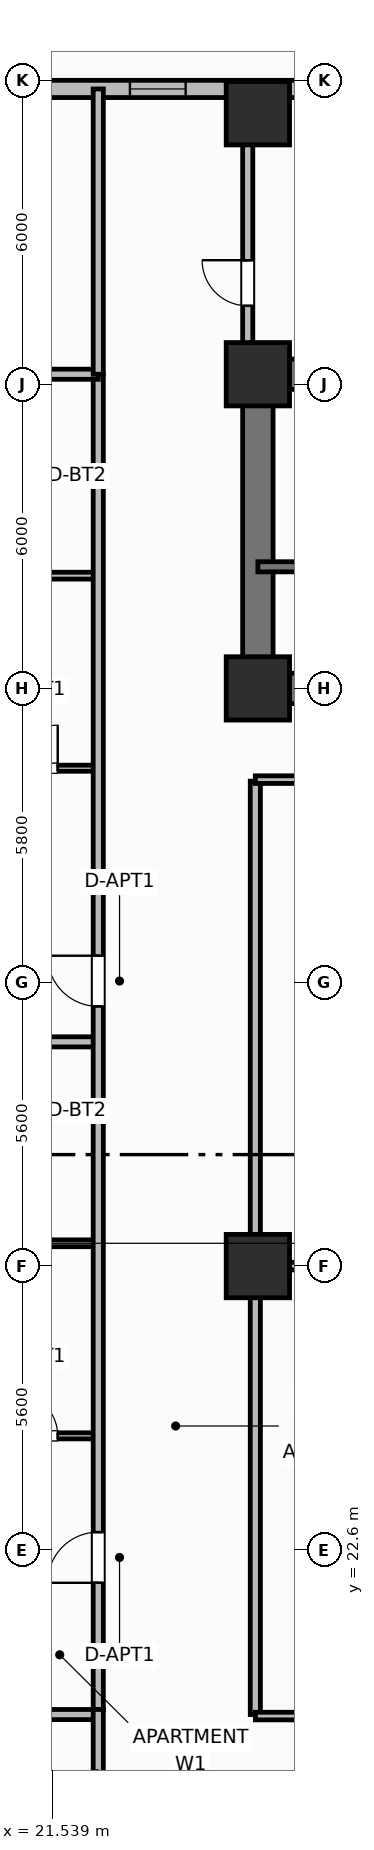
"""IFC4 building model, lengths in metres.
Left out: names, types, materials, properties, quantities, classifications, styles, units other than length and angle.
Written with IfcOpenShell. Run it as: python <this file> out.ifc"""

import sys

from ifc_helpers import new_model, si_unit, direction, frame, frame_2d, origin, origin_2d, place, context, subcontext, project, spatial, rectangle, extrude, element, fill, save


model = new_model("IFC4")
c1 = context("Model", 3, precision=1e-05, world=origin(), true_north=direction((0.0, 1.0)))
c2 = subcontext(c1, "Body", "Model", "MODEL_VIEW")
j1 = project(units=[si_unit("LENGTHUNIT", "METRE"), si_unit("PLANEANGLEUNIT", "RADIAN")], contexts=[c1])
p1 = place(None, origin())
s1 = spatial("IfcSite", under=j1, at=p1, CompositionType="ELEMENT")
p2 = place(p1, origin())
s2 = spatial("IfcBuilding", under=s1, at=p2, CompositionType="ELEMENT")
p3 = place(p2, frame((0.0, 0.0, 24.6)))
s3 = spatial("IfcBuildingStorey", under=s2, at=p3, CompositionType="ELEMENT", Elevation=24.6)
p4 = place(p3, frame((25.6, 45.8, 0.0), z_axis=(0.0, 0.0, 1.0), x_axis=(1.0, 0.0, 0.0)))
e1 = element("IfcWall", 1, at=p4, inside=s3, PredefinedType="SHEAR", context=c2, shape_type="SweptSolid", body=[
    extrude(rectangle(XDim=27.2, YDim=0.6, at=frame_2d((13.6, 0.0))), origin(), (0.0, 0.0, 1.0), 4.2),
])
p5 = place(p3, frame((25.6, 39.9, 0.0), z_axis=(0.0, 0.0, 1.0), x_axis=(0.0, 1.0, 0.0)))
e2 = element("IfcWall", 2, at=p5, inside=s3, PredefinedType="SHEAR", context=c2, shape_type="SweptSolid", body=[
    extrude(rectangle(XDim=5.6, YDim=0.6, at=frame_2d((2.8, 0.0))), origin(), (0.0, 0.0, 1.0), 4.2),
])
p6 = place(p3, frame((52.8, 39.6, 0.0), z_axis=(0.0, 0.0, 1.0), x_axis=(-1.0, 0.0, 0.0)))
e3 = element("IfcWall", 3, at=p6, inside=s3, PredefinedType="SHEAR", context=c2, shape_type="SweptSolid", body=[
    extrude(rectangle(XDim=27.2, YDim=0.6, at=frame_2d((13.6, 0.0))), origin(), (0.0, 0.0, 1.0), 4.2),
])
p7 = place(p6, frame((24.2, 0.0, 0.0)))
e4 = element("IfcOpeningElement", 4, at=p7, cuts=e3, PredefinedType="OPENING", context=c2, shape_type="SweptSolid", body=[
    extrude(rectangle(XDim=1.1, YDim=2.15, at=frame_2d((0.55, 1.075))), frame((0.0, 0.31, 0.0), z_axis=(0.0, -1.0, 0.0), x_axis=(1.0, 0.0, 0.0)), (0.0, 0.0, 1.0), 0.62),
])
p8 = place(p6, frame((20.55, 0.0, 0.0)))
e5 = element("IfcOpeningElement", 5, at=p8, cuts=e3, PredefinedType="OPENING", context=c2, shape_type="SweptSolid", body=[
    extrude(rectangle(XDim=0.95, YDim=2.1, at=frame_2d((0.475, 1.05))), frame((0.0, 0.31, 0.0), z_axis=(0.0, -1.0, 0.0), x_axis=(1.0, 0.0, 0.0)), (0.0, 0.0, 1.0), 0.62),
])
p9 = place(p6, frame((15.1, 0.0, 0.0)))
e6 = element("IfcOpeningElement", 6, at=p9, cuts=e3, PredefinedType="OPENING", context=c2, shape_type="SweptSolid", body=[
    extrude(rectangle(XDim=1.2, YDim=2.15, at=frame_2d((0.6, 1.075))), frame((0.0, 0.31, 0.0), z_axis=(0.0, -1.0, 0.0), x_axis=(1.0, 0.0, 0.0)), (0.0, 0.0, 1.0), 0.62),
])
p10 = place(p6, frame((11.6, 0.0, 0.0)))
e7 = element("IfcOpeningElement", 7, at=p10, cuts=e3, PredefinedType="OPENING", context=c2, shape_type="SweptSolid", body=[
    extrude(rectangle(XDim=0.9, YDim=2.1, at=frame_2d((0.45, 1.05))), frame((0.0, 0.31, 0.0), z_axis=(0.0, -1.0, 0.0), x_axis=(1.0, 0.0, 0.0)), (0.0, 0.0, 1.0), 0.62),
])
p11 = place(p6, frame((4.8, 0.0, 0.0)))
e8 = element("IfcOpeningElement", 8, at=p11, cuts=e3, PredefinedType="OPENING", context=c2, shape_type="SweptSolid", body=[
    extrude(rectangle(XDim=0.85, YDim=2.1, at=frame_2d((0.425, 1.05))), frame((0.0, 0.31, 0.0), z_axis=(0.0, -1.0, 0.0), x_axis=(1.0, 0.0, 0.0)), (0.0, 0.0, 1.0), 0.62),
])
p12 = place(p6, frame((1.9, 0.0, 0.0)))
e9 = element("IfcOpeningElement", 9, at=p12, cuts=e3, PredefinedType="OPENING", context=c2, shape_type="SweptSolid", body=[
    extrude(rectangle(XDim=0.85, YDim=2.1, at=frame_2d((0.425, 1.05))), frame((0.0, 0.31, 0.0), z_axis=(0.0, -1.0, 0.0), x_axis=(1.0, 0.0, 0.0)), (0.0, 0.0, 1.0), 0.62),
])
for number, where, z_axis, x_axis in (
    (10, (25.6, 39.6, 0.0), (0.0, 0.0, 1.0), (1.0, 0.0, 0.0)),
    (11, (25.6, 45.8, 0.0), (0.0, 0.0, 1.0), (1.0, 0.0, 0.0)),
    (12, (25.6, 28.2, 0.0), (0.0, 0.0, 1.0), (1.0, 0.0, 0.0)),
    (13, (25.6, 50.95, 0.0), (0.0, 0.0, 1.0), (1.0, 0.0, 0.0)),
):
    element("IfcColumn", number, at=place(p3, frame(where, z_axis=z_axis, x_axis=x_axis)), inside=s3, PredefinedType="COLUMN", context=c2, shape_type="SweptSolid", body=[
        extrude(rectangle(XDim=1.25, YDim=1.25, at=origin_2d()), origin(), (0.0, 0.0, 1.0), 4.2),
    ])
p13 = place(p3, frame((36.0, 51.43, 0.0), z_axis=(0.0, 0.0, 1.0), x_axis=(-1.0, 0.0, 0.0)))
e14 = element("IfcWall", 14, at=p13, inside=s3, PredefinedType="SOLIDWALL", context=c2, shape_type="SweptSolid", body=[
    extrude(rectangle(XDim=17.4, YDim=0.34, at=frame_2d((8.7, 0.0))), origin(), (0.0, 0.0, 1.0), 3.2),
])
p14 = place(p13, frame((4.125, 0.0, 0.95)))
e15 = element("IfcOpeningElement", 15, at=p14, cuts=e14, PredefinedType="OPENING", context=c2, shape_type="SweptSolid", body=[
    extrude(rectangle(XDim=1.1, YDim=1.65, at=frame_2d((0.55, 0.825))), frame((0.0, 0.18, 0.0), z_axis=(0.0, -1.0, 0.0), x_axis=(1.0, 0.0, 0.0)), (0.0, 0.0, 1.0), 0.36),
])
p15 = place(p13, frame((6.808, 0.0, 0.95)))
e16 = element("IfcOpeningElement", 16, at=p15, cuts=e14, PredefinedType="OPENING", context=c2, shape_type="SweptSolid", body=[
    extrude(rectangle(XDim=1.1, YDim=1.65, at=frame_2d((0.55, 0.825))), frame((0.0, 0.18, 0.0), z_axis=(0.0, -1.0, 0.0), x_axis=(1.0, 0.0, 0.0)), (0.0, 0.0, 1.0), 0.36),
])
p16 = place(p13, frame((11.825, 0.0, 0.95)))
e17 = element("IfcOpeningElement", 17, at=p16, cuts=e14, PredefinedType="OPENING", context=c2, shape_type="SweptSolid", body=[
    extrude(rectangle(XDim=1.1, YDim=1.65, at=frame_2d((0.55, 0.825))), frame((0.0, 0.18, 0.0), z_axis=(0.0, -1.0, 0.0), x_axis=(1.0, 0.0, 0.0)), (0.0, 0.0, 1.0), 0.36),
])
p17 = place(p13, frame((14.858, 0.0, 0.95)))
e18 = element("IfcOpeningElement", 18, at=p17, cuts=e14, PredefinedType="OPENING", context=c2, shape_type="SweptSolid", body=[
    extrude(rectangle(XDim=1.1, YDim=1.65, at=frame_2d((0.55, 0.825))), frame((0.0, 0.18, 0.0), z_axis=(0.0, -1.0, 0.0), x_axis=(1.0, 0.0, 0.0)), (0.0, 0.0, 1.0), 0.36),
])
p18 = place(p3, frame((35.15, 42.0, 0.0), z_axis=(0.0, 0.0, 1.0), x_axis=(-1.0, 0.0, 0.0)))
e19 = element("IfcWall", 19, at=p18, inside=s3, PredefinedType="SHEAR", context=c2, shape_type="SweptSolid", body=[
    extrude(rectangle(XDim=9.55, YDim=0.2, at=frame_2d((4.775, 0.0))), origin(), (0.0, 0.0, 1.0), 4.2),
])
p19 = place(p18, frame((7.25, 0.0, 0.0)))
e20 = element("IfcOpeningElement", 20, at=p19, cuts=e19, PredefinedType="OPENING", context=c2, shape_type="SweptSolid", body=[
    extrude(rectangle(XDim=1.1, YDim=2.15, at=frame_2d((0.55, 1.075))), frame((0.0, 0.11, 0.0), z_axis=(0.0, -1.0, 0.0), x_axis=(1.0, 0.0, 0.0)), (0.0, 0.0, 1.0), 0.22),
])
p20 = place(p3, frame((25.55, 19.35, 0.0), z_axis=(0.0, 0.0, 1.0), x_axis=(0.0, 1.0, 0.0)))
e21 = element("IfcWall", 21, at=p20, inside=s3, PredefinedType="PARTITIONING", context=c2, shape_type="SweptSolid", body=[
    extrude(rectangle(XDim=18.42, YDim=0.2, at=frame_2d((9.21, 0.0))), origin(), (0.0, 0.0, 1.0), 3.03),
])
p21 = place(p3, frame((14.57, 19.35, 0.0), z_axis=(0.0, 0.0, 1.0), x_axis=(1.0, 0.0, 0.0)))
e22 = element("IfcWall", 22, at=p21, inside=s3, PredefinedType="PARTITIONING", context=c2, shape_type="SweptSolid", body=[
    extrude(rectangle(XDim=7.88, YDim=0.2, at=frame_2d((3.94, 0.0))), origin(), (0.0, 0.0, 1.0), 3.03),
])
for number, where, z_axis, x_axis in (
    (23, (25.55, 19.32, 0.0), (0.0, 0.0, 1.0), (1.0, 0.0, 0.0)),
    (24, (25.55, 37.8, 0.0), (0.0, 0.0, 1.0), (1.0, 0.0, 0.0)),
):
    element("IfcWall", number, at=place(p3, frame(where, z_axis=z_axis, x_axis=x_axis)), inside=s3, PredefinedType="PARTITIONING", context=c2, shape_type="SweptSolid", body=[
        extrude(rectangle(XDim=14.9, YDim=0.15, at=frame_2d((7.45, 0.0))), origin(), (0.0, 0.0, 1.0), 3.03),
    ])
p22 = place(p3, frame((25.6, 28.2, 0.0), z_axis=(0.0, 0.0, 1.0), x_axis=(1.0, 0.0, 0.0)))
e25 = element("IfcWall", 25, at=p22, inside=s3, PredefinedType="PARTITIONING", context=c2, shape_type="SweptSolid", body=[
    extrude(rectangle(XDim=14.87, YDim=0.15, at=frame_2d((7.435, 0.0))), origin(), (0.0, 0.0, 1.0), 3.03),
])
p23 = place(p3, frame((20.2, 24.85, 0.0), z_axis=(0.0, 0.0, 1.0), x_axis=(1.0, 0.0, 0.0)))
e26 = element("IfcWall", 26, at=p23, inside=s3, PredefinedType="PARTITIONING", context=c2, shape_type="SweptSolid", body=[
    extrude(rectangle(XDim=2.25, YDim=0.12, at=frame_2d((1.125, 0.0))), origin(), (0.0, 0.0, 1.0), 3.03),
])
p24 = place(p23, frame((0.6, 0.0, 0.0)))
e27 = element("IfcOpeningElement", 27, at=p24, cuts=e26, PredefinedType="OPENING", context=c2, shape_type="SweptSolid", body=[
    extrude(rectangle(XDim=0.85, YDim=2.1, at=frame_2d((0.425, 1.05))), frame((0.0, 0.07, 0.0), z_axis=(0.0, -1.0, 0.0), x_axis=(1.0, 0.0, 0.0)), (0.0, 0.0, 1.0), 0.14),
])
p25 = place(p3, frame((20.2, 28.65, 0.0), z_axis=(0.0, 0.0, 1.0), x_axis=(1.0, 0.0, 0.0)))
e28 = element("IfcWall", 28, at=p25, inside=s3, PredefinedType="PARTITIONING", context=c2, shape_type="SweptSolid", body=[
    extrude(rectangle(XDim=2.25, YDim=0.135, at=frame_2d((1.125, 0.0))), origin(), (0.0, 0.0, 1.0), 3.03),
])
p26 = place(p3, frame((14.57, 32.625, 0.0), z_axis=(0.0, 0.0, 1.0), x_axis=(1.0, 0.0, 0.0)))
e29 = element("IfcWall", 29, at=p26, inside=s3, PredefinedType="PARTITIONING", context=c2, shape_type="SweptSolid", body=[
    extrude(rectangle(XDim=7.88, YDim=0.2, at=frame_2d((3.94, 0.0))), origin(), (0.0, 0.0, 1.0), 3.03),
])
p27 = place(p3, frame((20.2, 38.025, 0.0), z_axis=(0.0, 0.0, 1.0), x_axis=(1.0, 0.0, 0.0)))
e30 = element("IfcWall", 30, at=p27, inside=s3, PredefinedType="PARTITIONING", context=c2, shape_type="SweptSolid", body=[
    extrude(rectangle(XDim=2.25, YDim=0.12, at=frame_2d((1.125, 0.0))), origin(), (0.0, 0.0, 1.0), 3.03),
])
p28 = place(p27, frame((0.6, 0.0, 0.0)))
e31 = element("IfcOpeningElement", 31, at=p28, cuts=e30, PredefinedType="OPENING", context=c2, shape_type="SweptSolid", body=[
    extrude(rectangle(XDim=0.85, YDim=2.1, at=frame_2d((0.425, 1.05))), frame((0.0, 0.07, 0.0), z_axis=(0.0, -1.0, 0.0), x_axis=(1.0, 0.0, 0.0)), (0.0, 0.0, 1.0), 0.14),
])
p29 = place(p3, frame((20.2, 41.825, 0.0), z_axis=(0.0, 0.0, 1.0), x_axis=(1.0, 0.0, 0.0)))
e32 = element("IfcWall", 32, at=p29, inside=s3, PredefinedType="PARTITIONING", context=c2, shape_type="SweptSolid", body=[
    extrude(rectangle(XDim=2.25, YDim=0.135, at=frame_2d((1.125, 0.0))), origin(), (0.0, 0.0, 1.0), 3.03),
])
p30 = place(p3, frame((22.45, 19.45, 0.0), z_axis=(0.0, 0.0, 1.0), x_axis=(0.0, 1.0, 0.0)))
e33 = element("IfcWall", 33, at=p30, inside=s3, PredefinedType="PARTITIONING", context=c2, shape_type="SweptSolid", body=[
    extrude(rectangle(XDim=26.35, YDim=0.2, at=frame_2d((13.175, 0.0))), origin(), (0.0, 0.0, 1.0), 3.03),
])
p31 = place(p30, frame((2.5, 0.0, 0.0)))
e34 = element("IfcOpeningElement", 34, at=p31, cuts=e33, PredefinedType="OPENING", context=c2, shape_type="SweptSolid", body=[
    extrude(rectangle(XDim=1.0, YDim=2.15, at=frame_2d((0.5, 1.075))), frame((0.0, 0.11, 0.0), z_axis=(0.0, -1.0, 0.0), x_axis=(1.0, 0.0, 0.0)), (0.0, 0.0, 1.0), 0.22),
])
p32 = place(p30, frame((13.875, 0.0, 0.0)))
e35 = element("IfcOpeningElement", 35, at=p32, cuts=e33, PredefinedType="OPENING", context=c2, shape_type="SweptSolid", body=[
    extrude(rectangle(XDim=1.0, YDim=2.15, at=frame_2d((0.5, 1.075))), frame((0.0, 0.11, 0.0), z_axis=(0.0, -1.0, 0.0), x_axis=(1.0, 0.0, 0.0)), (0.0, 0.0, 1.0), 0.22),
])
p33 = place(p3, frame((14.99, 45.8, 0.0), z_axis=(0.0, 0.0, 1.0), x_axis=(1.0, 0.0, 0.0)))
e36 = element("IfcWall", 36, at=p33, inside=s3, PredefinedType="PARTITIONING", context=c2, shape_type="SweptSolid", body=[
    extrude(rectangle(XDim=7.46, YDim=0.2, at=frame_2d((3.73, 0.0))), origin(), (0.0, 0.0, 1.0), 3.03),
])
p34 = place(p3, frame((22.45, 4.97, 0.0), z_axis=(0.0, 0.0, 1.0), x_axis=(0.0, 1.0, 0.0)))
e37 = element("IfcWall", 37, at=p34, inside=s3, PredefinedType="PARTITIONING", context=c2, shape_type="SweptSolid", body=[
    extrude(rectangle(XDim=14.48, YDim=0.2, at=frame_2d((7.24, 0.0))), origin(), (0.0, 0.0, 1.0), 3.03),
])
p35 = place(p3, frame((22.45, 45.8, 0.0), z_axis=(0.0, 0.0, 1.0), x_axis=(0.0, 1.0, 0.0)))
e38 = element("IfcWall", 38, at=p35, inside=s3, PredefinedType="PARTITIONING", context=c2, shape_type="SweptSolid", body=[
    extrude(rectangle(XDim=5.63, YDim=0.2, at=frame_2d((2.815, 0.0))), origin(), (0.0, 0.0, 1.0), 3.03),
])
p36 = place(p3, frame((25.4, 46.1, 0.0), z_axis=(0.0, 0.0, 1.0), x_axis=(0.0, 1.0, 0.0)))
e39 = element("IfcWall", 39, at=p36, inside=s3, PredefinedType="PARTITIONING", context=c2, shape_type="SweptSolid", body=[
    extrude(rectangle(XDim=4.83, YDim=0.2, at=frame_2d((2.415, 0.0))), origin(), (0.0, 0.0, 1.0), 3.03),
])
p37 = place(p36, frame((1.05, 0.0, 0.0)))
e40 = element("IfcOpeningElement", 40, at=p37, cuts=e39, PredefinedType="OPENING", context=c2, shape_type="SweptSolid", body=[
    extrude(rectangle(XDim=0.9, YDim=2.1, at=frame_2d((0.45, 1.05))), frame((0.0, 0.11, 0.0), z_axis=(0.0, -1.0, 0.0), x_axis=(1.0, 0.0, 0.0)), (0.0, 0.0, 1.0), 0.22),
])
p38 = place(p16, origin())
e41 = element("IfcWindow", 41, at=p38, inside=s3, PartitioningType="SINGLE_PANEL", PredefinedType="WINDOW", context=c2, shape_type="SweptSolid", body=[
    extrude(rectangle(XDim=1.1, YDim=1.65, at=frame_2d((0.55, 0.825))), frame((0.0, 0.03, 0.0), z_axis=(0.0, -1.0, 0.0), x_axis=(1.0, 0.0, 0.0)), (0.0, 0.0, 1.0), 0.06),
])
fill(e17, e41)
p39 = place(p24, origin())
e42 = element("IfcDoor", 42, at=p39, inside=s3, OperationType="SINGLE_SWING_LEFT", PredefinedType="DOOR", context=c2, shape_type="SweptSolid", body=[
    extrude(rectangle(XDim=0.85, YDim=2.1, at=frame_2d((0.425, 1.05))), frame((0.0, 0.025, 0.0), z_axis=(0.0, -1.0, 0.0), x_axis=(1.0, 0.0, 0.0)), (0.0, 0.0, 1.0), 0.05),
])
fill(e27, e42)
p40 = place(p28, origin())
e43 = element("IfcDoor", 43, at=p40, inside=s3, OperationType="SINGLE_SWING_RIGHT", PredefinedType="DOOR", context=c2, shape_type="SweptSolid", body=[
    extrude(rectangle(XDim=0.85, YDim=2.1, at=frame_2d((0.425, 1.05))), frame((0.0, 0.025, 0.0), z_axis=(0.0, -1.0, 0.0), x_axis=(1.0, 0.0, 0.0)), (0.0, 0.0, 1.0), 0.05),
])
fill(e31, e43)
p41 = place(p31, origin())
e44 = element("IfcDoor", 44, at=p41, inside=s3, OperationType="SINGLE_SWING_LEFT", PredefinedType="DOOR", context=c2, shape_type="SweptSolid", body=[
    extrude(rectangle(XDim=1.0, YDim=2.15, at=frame_2d((0.5, 1.075))), frame((0.0, 0.025, 0.0), z_axis=(0.0, -1.0, 0.0), x_axis=(1.0, 0.0, 0.0)), (0.0, 0.0, 1.0), 0.05),
])
fill(e34, e44)
p42 = place(p32, origin())
e45 = element("IfcDoor", 45, at=p42, inside=s3, OperationType="SINGLE_SWING_RIGHT", PredefinedType="DOOR", context=c2, shape_type="SweptSolid", body=[
    extrude(rectangle(XDim=1.0, YDim=2.15, at=frame_2d((0.5, 1.075))), frame((0.0, 0.025, 0.0), z_axis=(0.0, -1.0, 0.0), x_axis=(1.0, 0.0, 0.0)), (0.0, 0.0, 1.0), 0.05),
])
fill(e35, e45)
p43 = place(p37, origin())
e46 = element("IfcDoor", 46, at=p43, inside=s3, OperationType="SINGLE_SWING_RIGHT", PredefinedType="DOOR", context=c2, shape_type="SweptSolid", body=[
    extrude(rectangle(XDim=0.9, YDim=2.1, at=frame_2d((0.45, 1.05))), frame((0.0, 0.025, 0.0), z_axis=(0.0, -1.0, 0.0), x_axis=(1.0, 0.0, 0.0)), (0.0, 0.0, 1.0), 0.05),
])
fill(e40, e46)
save(model, sys.argv[1])
